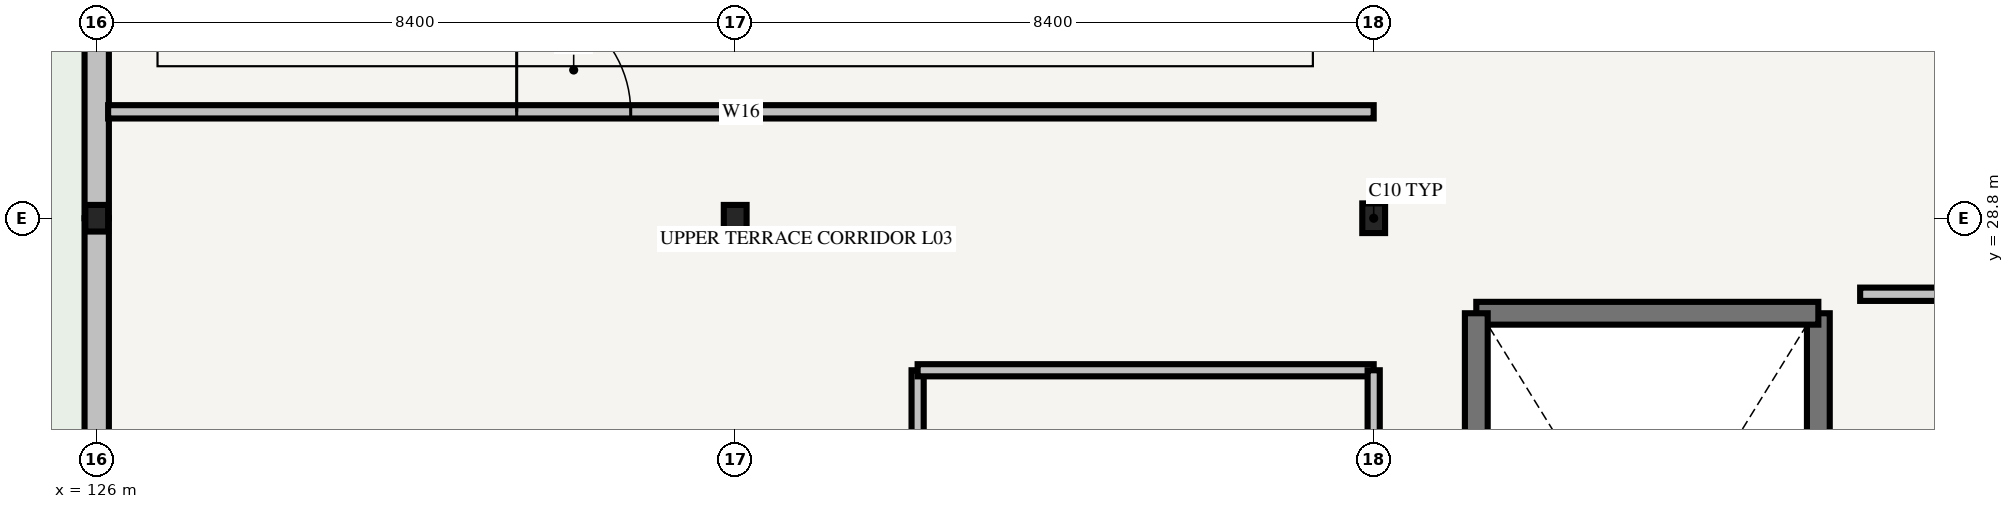
"""IFC4 building model, lengths in metres.
Left out: names, types, materials, properties, quantities, classifications, styles, units other than length and angle.
Written with IfcOpenShell. Run it as: python <this file> out.ifc"""

import sys

from ifc_helpers import new_model, si_unit, direction, frame, frame_2d, origin, origin_2d, place, context, subcontext, project, spatial, rectangle, i_section, extrude, element, fill, save


model = new_model("IFC4")
c1 = context("Model", 3, precision=1e-05, world=origin(), true_north=direction((0.0, 1.0)))
c2 = subcontext(c1, "Body", "Model", "MODEL_VIEW")
j1 = project(units=[si_unit("LENGTHUNIT", "METRE"), si_unit("PLANEANGLEUNIT", "RADIAN")], contexts=[c1])
p1 = place(None, origin())
s1 = spatial("IfcSite", under=j1, at=p1, CompositionType="ELEMENT")
p2 = place(p1, origin())
s2 = spatial("IfcBuilding", under=s1, at=p2, CompositionType="ELEMENT")
p3 = place(p2, frame((0.0, 0.0, 12.9)))
s3 = spatial("IfcBuildingStorey", under=s2, at=p3, CompositionType="ELEMENT", Elevation=12.9)
for number, where, z_axis, x_axis in (
    (1, (126.0, 28.8, 0.0), (0.0, 0.0, 1.0), (1.0, 0.0, 0.0)),
    (2, (134.4, 28.8, 0.0), (0.0, 0.0, 1.0), (1.0, 0.0, 0.0)),
):
    element("IfcColumn", number, at=place(p3, frame(where, z_axis=z_axis, x_axis=x_axis)), inside=s3, PredefinedType="COLUMN", context=c2, shape_type="SweptSolid", body=[
        extrude(i_section(OverallWidth=0.3, OverallDepth=0.35, WebThickness=0.01, FlangeThickness=0.018, FilletRadius=0.027, at=origin_2d()), origin(), (0.0, 0.0, 1.0), 4.2),
    ])
p4 = place(p3, frame((142.8, 28.8, 0.0), z_axis=(0.0, 0.0, 1.0), x_axis=(1.0, 0.0, 0.0)))
e3 = element("IfcColumn", 3, at=p4, inside=s3, PredefinedType="COLUMN", context=c2, shape_type="SweptSolid", body=[
    extrude(i_section(OverallWidth=0.3, OverallDepth=0.39, WebThickness=0.011, FlangeThickness=0.019, FilletRadius=0.027, at=origin_2d()), origin(), (0.0, 0.0, 1.0), 4.2),
])
p5 = place(p3, frame((126.0, 36.0, 0.0), z_axis=(0.0, 0.0, 1.0), x_axis=(0.0, -1.0, 0.0)))
e4 = element("IfcWall", 4, at=p5, inside=s3, PredefinedType="STANDARD", context=c2, shape_type="SweptSolid", body=[
    extrude(rectangle(XDim=7.2, YDim=0.32, at=frame_2d((3.6, 0.0))), origin(), (0.0, 0.0, 1.0), 3.345),
])
p6 = place(p5, frame((2.8, 0.0, 0.0)))
e5 = element("IfcOpeningElement", 5, at=p6, cuts=e4, PredefinedType="OPENING", context=c2, shape_type="SweptSolid", body=[
    extrude(rectangle(XDim=1.6, YDim=2.3, at=frame_2d((0.8, 1.15))), frame((0.0, 0.185, 0.0), z_axis=(0.0, -1.0, 0.0), x_axis=(1.0, 0.0, 0.0)), (0.0, 0.0, 1.0), 0.37),
])
p7 = place(p3, frame((126.0, 28.8, 0.0), z_axis=(0.0, 0.0, 1.0), x_axis=(0.0, -1.0, 0.0)))
e6 = element("IfcWall", 6, at=p7, inside=s3, PredefinedType="STANDARD", context=c2, shape_type="SweptSolid", body=[
    extrude(rectangle(XDim=7.2, YDim=0.32, at=frame_2d((3.6, 0.0))), origin(), (0.0, 0.0, 1.0), 3.345),
])
p8 = place(p7, frame((3.0, 0.0, 0.0)))
e7 = element("IfcOpeningElement", 7, at=p8, cuts=e6, PredefinedType="OPENING", context=c2, shape_type="SweptSolid", body=[
    extrude(rectangle(XDim=1.2, YDim=2.25, at=frame_2d((0.6, 1.125))), frame((0.0, 0.185, 0.0), z_axis=(0.0, -1.0, 0.0), x_axis=(1.0, 0.0, 0.0)), (0.0, 0.0, 1.0), 0.37),
])
p9 = place(p3, frame((148.65, 20.45, 0.0), z_axis=(0.0, 0.0, 1.0), x_axis=(0.0, 1.0, 0.0)))
e8 = element("IfcWall", 8, at=p9, inside=s3, PredefinedType="SHEAR", context=c2, shape_type="SweptSolid", body=[
    extrude(rectangle(XDim=7.1, YDim=0.3, at=frame_2d((3.55, 0.0))), origin(), (0.0, 0.0, 1.0), 4.56),
])
p10 = place(p3, frame((148.65, 27.55, 0.0), z_axis=(0.0, 0.0, 1.0), x_axis=(-1.0, 0.0, 0.0)))
e9 = element("IfcWall", 9, at=p10, inside=s3, PredefinedType="SHEAR", context=c2, shape_type="SweptSolid", body=[
    extrude(rectangle(XDim=4.5, YDim=0.3, at=frame_2d((2.25, 0.0))), origin(), (0.0, 0.0, 1.0), 4.56),
])
p11 = place(p3, frame((144.15, 27.55, 0.0), z_axis=(0.0, 0.0, 1.0), x_axis=(0.0, -1.0, 0.0)))
e10 = element("IfcWall", 10, at=p11, inside=s3, PredefinedType="SHEAR", context=c2, shape_type="SweptSolid", body=[
    extrude(rectangle(XDim=7.1, YDim=0.3, at=frame_2d((3.55, 0.0))), origin(), (0.0, 0.0, 1.0), 4.56),
])
p12 = place(p3, frame((126.15, 30.2, 0.0), z_axis=(0.0, 0.0, 1.0), x_axis=(1.0, 0.0, 0.0)))
e11 = element("IfcWall", 11, at=p12, inside=s3, PredefinedType="PARTITIONING", context=c2, shape_type="SweptSolid", body=[
    extrude(rectangle(XDim=16.65, YDim=0.175, at=frame_2d((8.325, 0.0))), origin(), (0.0, 0.0, 1.0), 3.32),
])
p13 = place(p12, frame((5.375, 0.0, 0.0)))
e12 = element("IfcOpeningElement", 12, at=p13, cuts=e11, PredefinedType="OPENING", context=c2, shape_type="SweptSolid", body=[
    extrude(rectangle(XDim=1.5, YDim=2.2, at=frame_2d((0.75, 1.1))), frame((0.0, 0.112, 0.0), z_axis=(0.0, -1.0, 0.0), x_axis=(1.0, 0.0, 0.0)), (0.0, 0.0, 1.0), 0.225),
])
p14 = place(p3, frame((136.8, 22.7, 0.0), z_axis=(0.0, 0.0, 1.0), x_axis=(0.0, 1.0, 0.0)))
e13 = element("IfcWall", 13, at=p14, inside=s3, PredefinedType="PARTITIONING", context=c2, shape_type="SweptSolid", body=[
    extrude(rectangle(XDim=4.1, YDim=0.16, at=frame_2d((2.05, 0.0))), origin(), (0.0, 0.0, 1.0), 3.32),
])
p15 = place(p14, frame((1.55, 0.0, 0.0)))
e14 = element("IfcOpeningElement", 14, at=p15, cuts=e13, PredefinedType="OPENING", context=c2, shape_type="SweptSolid", body=[
    extrude(rectangle(XDim=1.0, YDim=2.15, at=frame_2d((0.5, 1.075))), frame((0.0, 0.105, 0.0), z_axis=(0.0, -1.0, 0.0), x_axis=(1.0, 0.0, 0.0)), (0.0, 0.0, 1.0), 0.21),
])
p16 = place(p3, frame((136.8, 26.8, 0.0), z_axis=(0.0, 0.0, 1.0), x_axis=(1.0, 0.0, 0.0)))
e15 = element("IfcWall", 15, at=p16, inside=s3, PredefinedType="PARTITIONING", context=c2, shape_type="SweptSolid", body=[
    extrude(rectangle(XDim=6.0, YDim=0.16, at=frame_2d((3.0, 0.0))), origin(), (0.0, 0.0, 1.0), 3.32),
])
p17 = place(p3, frame((142.8, 14.55, 0.0), z_axis=(0.0, 0.0, 1.0), x_axis=(0.0, 1.0, 0.0)))
e16 = element("IfcWall", 16, at=p17, inside=s3, PredefinedType="PARTITIONING", context=c2, shape_type="SweptSolid", body=[
    extrude(rectangle(XDim=12.25, YDim=0.16, at=frame_2d((6.125, 0.0))), origin(), (0.0, 0.0, 1.0), 3.32),
])
p18 = place(p3, frame((149.2, 27.8, 0.0), z_axis=(0.0, 0.0, 1.0), x_axis=(1.0, 0.0, 0.0)))
e17 = element("IfcWall", 17, at=p18, inside=s3, PredefinedType="PARTITIONING", context=c2, shape_type="SweptSolid", body=[
    extrude(rectangle(XDim=5.4, YDim=0.175, at=frame_2d((2.7, 0.0))), origin(), (0.0, 0.0, 1.0), 3.32),
])
p19 = place(p13, origin())
e18 = element("IfcDoor", 18, at=p19, inside=s3, OperationType="DOUBLE_DOOR_SINGLE_SWING", PredefinedType="DOOR", context=c2, shape_type="SweptSolid", body=[
    extrude(rectangle(XDim=1.5, YDim=2.2, at=frame_2d((0.75, 1.1))), frame((0.0, 0.025, 0.0), z_axis=(0.0, -1.0, 0.0), x_axis=(1.0, 0.0, 0.0)), (0.0, 0.0, 1.0), 0.05),
])
fill(e12, e18)
save(model, sys.argv[1])
